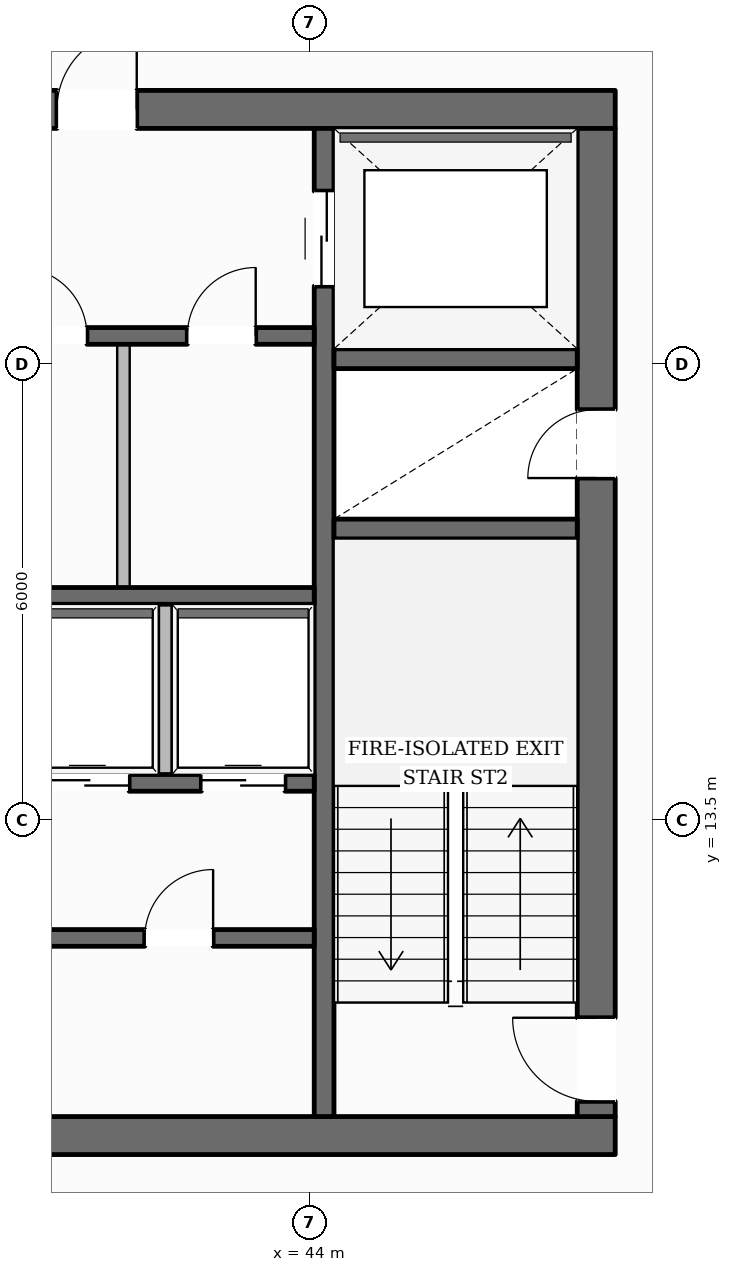
"""IFC4 building model, lengths in metres.
Left out: names, types, materials, properties, quantities, classifications, styles, units other than length and angle.
Written with IfcOpenShell. Run it as: python <this file> out.ifc"""

import sys

from ifc_helpers import new_model, si_unit, direction, frame, frame_2d, origin, place, context, subcontext, project, spatial, rectangle, extrude, element, fill, save


model = new_model("IFC4")
c1 = context("Model", 3, precision=1e-05, world=origin(), true_north=direction((0.0, 1.0)))
c2 = subcontext(c1, "Body", "Model", "MODEL_VIEW")
j1 = project(units=[si_unit("LENGTHUNIT", "METRE"), si_unit("PLANEANGLEUNIT", "RADIAN")], contexts=[c1])
p1 = place(None, origin())
s1 = spatial("IfcSite", under=j1, at=p1, CompositionType="ELEMENT")
p2 = place(p1, origin())
s2 = spatial("IfcBuilding", under=s1, at=p2, CompositionType="ELEMENT")
p3 = place(p2, frame((0.0, 0.0, 120.15)))
s3 = spatial("IfcBuildingStorey", under=s2, at=p3, CompositionType="ELEMENT", Elevation=120.15)
p4 = place(p3, frame((27.98, 9.35, 0.0), z_axis=(0.0, 0.0, 1.0), x_axis=(1.0, 0.0, 0.0)))
e1 = element("IfcWall", 1, at=p4, inside=s3, PredefinedType="SOLIDWALL", context=c2, shape_type="SweptSolid", body=[
    extrude(rectangle(XDim=20.04, YDim=0.5, at=frame_2d((10.02, 0.0))), origin(), (0.0, 0.0, 1.0), 3.6),
])
p5 = place(p4, frame((10.52, 0.0, 0.0)))
e2 = element("IfcOpeningElement", 2, at=p5, cuts=e1, PredefinedType="OPENING", context=c2, shape_type="SweptSolid", body=[
    extrude(rectangle(XDim=1.4, YDim=2.2, at=frame_2d((0.7, 1.1))), frame((0.0, 0.26, 0.0), z_axis=(0.0, -1.0, 0.0), x_axis=(1.0, 0.0, 0.0)), (0.0, 0.0, 1.0), 0.52),
])
p6 = place(p3, frame((27.98, 22.85, 0.0), z_axis=(0.0, 0.0, 1.0), x_axis=(1.0, 0.0, 0.0)))
e3 = element("IfcWall", 3, at=p6, inside=s3, PredefinedType="SOLIDWALL", context=c2, shape_type="SweptSolid", body=[
    extrude(rectangle(XDim=20.04, YDim=0.5, at=frame_2d((10.02, 0.0))), origin(), (0.0, 0.0, 1.0), 3.6),
])
p7 = place(p6, frame((6.295, 0.0, 0.0)))
e4 = element("IfcOpeningElement", 4, at=p7, cuts=e3, PredefinedType="OPENING", context=c2, shape_type="SweptSolid", body=[
    extrude(rectangle(XDim=1.05, YDim=2.15, at=frame_2d((0.525, 1.075))), frame((0.0, 0.26, 0.0), z_axis=(0.0, -1.0, 0.0), x_axis=(1.0, 0.0, 0.0)), (0.0, 0.0, 1.0), 0.52),
])
p8 = place(p6, frame((12.695, 0.0, 0.0)))
e5 = element("IfcOpeningElement", 5, at=p8, cuts=e3, PredefinedType="OPENING", context=c2, shape_type="SweptSolid", body=[
    extrude(rectangle(XDim=1.05, YDim=2.15, at=frame_2d((0.525, 1.075))), frame((0.0, 0.26, 0.0), z_axis=(0.0, -1.0, 0.0), x_axis=(1.0, 0.0, 0.0)), (0.0, 0.0, 1.0), 0.52),
])
p9 = place(p3, frame((47.77, 9.6, 0.0), z_axis=(0.0, 0.0, 1.0), x_axis=(0.0, 1.0, 0.0)))
e6 = element("IfcWall", 6, at=p9, inside=s3, PredefinedType="SOLIDWALL", context=c2, shape_type="SweptSolid", body=[
    extrude(rectangle(XDim=13.0, YDim=0.5, at=frame_2d((6.5, 0.0))), origin(), (0.0, 0.0, 1.0), 3.6),
])
p10 = place(p9, frame((0.2, 0.0, 0.0)))
e7 = element("IfcOpeningElement", 7, at=p10, cuts=e6, PredefinedType="OPENING", context=c2, shape_type="SweptSolid", body=[
    extrude(rectangle(XDim=1.1, YDim=2.15, at=frame_2d((0.55, 1.075))), frame((0.0, 0.26, 0.0), z_axis=(0.0, -1.0, 0.0), x_axis=(1.0, 0.0, 0.0)), (0.0, 0.0, 1.0), 0.52),
])
p11 = place(p9, frame((8.4, 0.0, 0.0)))
e8 = element("IfcOpeningElement", 8, at=p11, cuts=e6, PredefinedType="OPENING", context=c2, shape_type="SweptSolid", body=[
    extrude(rectangle(XDim=0.9, YDim=2.1, at=frame_2d((0.45, 1.05))), frame((0.0, 0.26, 0.0), z_axis=(0.0, -1.0, 0.0), x_axis=(1.0, 0.0, 0.0)), (0.0, 0.0, 1.0), 0.52),
])
p12 = place(p3, frame((44.19, 9.6, 0.0), z_axis=(0.0, 0.0, 1.0), x_axis=(0.0, 1.0, 0.0)))
e9 = element("IfcWall", 9, at=p12, inside=s3, PredefinedType="SHEAR", context=c2, shape_type="SweptSolid", body=[
    extrude(rectangle(XDim=13.0, YDim=0.26, at=frame_2d((6.5, 0.0))), origin(), (0.0, 0.0, 1.0), 3.6),
])
p13 = place(p12, frame((10.925, 0.0, 0.0)))
e10 = element("IfcOpeningElement", 10, at=p13, cuts=e9, PredefinedType="OPENING", context=c2, shape_type="SweptSolid", body=[
    extrude(rectangle(XDim=1.25, YDim=2.25, at=frame_2d((0.625, 1.125))), frame((0.0, 0.14, 0.0), z_axis=(0.0, -1.0, 0.0), x_axis=(1.0, 0.0, 0.0)), (0.0, 0.0, 1.0), 0.28),
])
for number, where, z_axis, x_axis in (
    (11, (44.32, 17.33, 0.0), (0.0, 0.0, 1.0), (1.0, 0.0, 0.0)),
    (12, (44.32, 19.57, 0.0), (0.0, 0.0, 1.0), (1.0, 0.0, 0.0)),
):
    element("IfcWall", number, at=place(p3, frame(where, z_axis=z_axis, x_axis=x_axis)), inside=s3, PredefinedType="SHEAR", context=c2, shape_type="SweptSolid", body=[
        extrude(rectangle(XDim=3.2, YDim=0.26, at=frame_2d((1.6, 0.0))), origin(), (0.0, 0.0, 1.0), 3.6),
    ])
p14 = place(p3, frame((31.94, 19.87, 0.0), z_axis=(0.0, 0.0, 1.0), x_axis=(1.0, 0.0, 0.0)))
e13 = element("IfcWall", 13, at=p14, inside=s3, PredefinedType="SOLIDWALL", context=c2, shape_type="SweptSolid", body=[
    extrude(rectangle(XDim=12.12, YDim=0.22, at=frame_2d((6.06, 0.0))), origin(), (0.0, 0.0, 1.0), 3.6),
])
p15 = place(p14, frame((6.3, 0.0, 0.0)))
e14 = element("IfcOpeningElement", 14, at=p15, cuts=e13, PredefinedType="OPENING", context=c2, shape_type="SweptSolid", body=[
    extrude(rectangle(XDim=1.1, YDim=2.15, at=frame_2d((0.55, 1.075))), frame((0.0, 0.12, 0.0), z_axis=(0.0, -1.0, 0.0), x_axis=(1.0, 0.0, 0.0)), (0.0, 0.0, 1.0), 0.24),
])
p16 = place(p14, frame((8.23, 0.0, 0.0)))
e15 = element("IfcOpeningElement", 15, at=p16, cuts=e13, PredefinedType="OPENING", context=c2, shape_type="SweptSolid", body=[
    extrude(rectangle(XDim=0.9, YDim=2.1, at=frame_2d((0.45, 1.05))), frame((0.0, 0.12, 0.0), z_axis=(0.0, -1.0, 0.0), x_axis=(1.0, 0.0, 0.0)), (0.0, 0.0, 1.0), 0.24),
])
p17 = place(p14, frame((10.45, 0.0, 0.0)))
e16 = element("IfcOpeningElement", 16, at=p17, cuts=e13, PredefinedType="OPENING", context=c2, shape_type="SweptSolid", body=[
    extrude(rectangle(XDim=0.9, YDim=2.1, at=frame_2d((0.45, 1.05))), frame((0.0, 0.12, 0.0), z_axis=(0.0, -1.0, 0.0), x_axis=(1.0, 0.0, 0.0)), (0.0, 0.0, 1.0), 0.24),
])
p18 = place(p3, frame((31.94, 16.45, 0.0), z_axis=(0.0, 0.0, 1.0), x_axis=(1.0, 0.0, 0.0)))
e17 = element("IfcWall", 17, at=p18, inside=s3, PredefinedType="SOLIDWALL", context=c2, shape_type="SweptSolid", body=[
    extrude(rectangle(XDim=12.12, YDim=0.22, at=frame_2d((6.06, 0.0))), origin(), (0.0, 0.0, 1.0), 3.6),
])
p19 = place(p3, frame((31.94, 13.99, 0.0), z_axis=(0.0, 0.0, 1.0), x_axis=(1.0, 0.0, 0.0)))
e18 = element("IfcWall", 18, at=p19, inside=s3, PredefinedType="SOLIDWALL", context=c2, shape_type="SweptSolid", body=[
    extrude(rectangle(XDim=12.12, YDim=0.22, at=frame_2d((6.06, 0.0))), origin(), (0.0, 0.0, 1.0), 3.6),
])
p20 = place(p19, frame((2.51, 0.0, 0.0)))
e19 = element("IfcOpeningElement", 19, at=p20, cuts=e18, PredefinedType="OPENING", context=c2, shape_type="SweptSolid", body=[
    extrude(rectangle(XDim=0.9, YDim=2.1, at=frame_2d((0.45, 1.05))), frame((0.0, 0.12, 0.0), z_axis=(0.0, -1.0, 0.0), x_axis=(1.0, 0.0, 0.0)), (0.0, 0.0, 1.0), 0.24),
])
p21 = place(p19, frame((6.535, 0.0, 0.0)))
e20 = element("IfcOpeningElement", 20, at=p21, cuts=e18, PredefinedType="OPENING", context=c2, shape_type="SweptSolid", body=[
    extrude(rectangle(XDim=1.1, YDim=2.2, at=frame_2d((0.55, 1.1))), frame((0.0, 0.12, 0.0), z_axis=(0.0, -1.0, 0.0), x_axis=(1.0, 0.0, 0.0)), (0.0, 0.0, 1.0), 0.24),
])
p22 = place(p19, frame((8.585, 0.0, 0.0)))
e21 = element("IfcOpeningElement", 21, at=p22, cuts=e18, PredefinedType="OPENING", context=c2, shape_type="SweptSolid", body=[
    extrude(rectangle(XDim=1.1, YDim=2.2, at=frame_2d((0.55, 1.1))), frame((0.0, 0.12, 0.0), z_axis=(0.0, -1.0, 0.0), x_axis=(1.0, 0.0, 0.0)), (0.0, 0.0, 1.0), 0.24),
])
p23 = place(p19, frame((10.635, 0.0, 0.0)))
e22 = element("IfcOpeningElement", 22, at=p23, cuts=e18, PredefinedType="OPENING", context=c2, shape_type="SweptSolid", body=[
    extrude(rectangle(XDim=1.1, YDim=2.2, at=frame_2d((0.55, 1.1))), frame((0.0, 0.12, 0.0), z_axis=(0.0, -1.0, 0.0), x_axis=(1.0, 0.0, 0.0)), (0.0, 0.0, 1.0), 0.24),
])
p24 = place(p3, frame((40.28, 11.95, 0.0), z_axis=(0.0, 0.0, 1.0), x_axis=(1.0, 0.0, 0.0)))
e23 = element("IfcWall", 23, at=p24, inside=s3, PredefinedType="SOLIDWALL", context=c2, shape_type="SweptSolid", body=[
    extrude(rectangle(XDim=3.78, YDim=0.22, at=frame_2d((1.89, 0.0))), origin(), (0.0, 0.0, 1.0), 3.6),
])
p25 = place(p24, frame((1.55, 0.0, 0.0)))
e24 = element("IfcOpeningElement", 24, at=p25, cuts=e23, PredefinedType="OPENING", context=c2, shape_type="SweptSolid", body=[
    extrude(rectangle(XDim=0.9, YDim=2.1, at=frame_2d((0.45, 1.05))), frame((0.0, 0.12, 0.0), z_axis=(0.0, -1.0, 0.0), x_axis=(1.0, 0.0, 0.0)), (0.0, 0.0, 1.0), 0.24),
])
p26 = place(p3, frame((43.959, 44.406, 0.0), z_axis=(0.0, 0.0, 1.0), x_axis=(0.50514079069, -0.863036952616, 0.0)))
e25 = element("IfcWall", 25, at=p26, inside=s3, PredefinedType="STANDARD", context=c2, shape_type="SweptSolid", body=[
    extrude(rectangle(XDim=36.948, YDim=0.38, at=frame_2d((18.474, 0.0))), origin(), (0.0, 0.0, 1.0), 3.059),
])
p27 = place(p26, frame((32.695, 0.0, 0.65)))
e26 = element("IfcOpeningElement", 26, at=p27, cuts=e25, PredefinedType="OPENING", context=c2, shape_type="SweptSolid", body=[
    extrude(rectangle(XDim=1.55, YDim=1.75, at=frame_2d((0.775, 0.875))), frame((0.0, 0.2, 0.0), z_axis=(0.0, -1.0, 0.0), x_axis=(1.0, 0.0, 0.0)), (0.0, 0.0, 1.0), 0.4),
])
p28 = place(p26, frame((26.696, 0.0, 0.65)))
e27 = element("IfcOpeningElement", 27, at=p28, cuts=e25, PredefinedType="OPENING", context=c2, shape_type="SweptSolid", body=[
    extrude(rectangle(XDim=1.55, YDim=1.75, at=frame_2d((0.775, 0.875))), frame((0.0, 0.2, 0.0), z_axis=(0.0, -1.0, 0.0), x_axis=(1.0, 0.0, 0.0)), (0.0, 0.0, 1.0), 0.4),
])
p29 = place(p26, frame((20.696, 0.0, 0.65)))
e28 = element("IfcOpeningElement", 28, at=p29, cuts=e25, PredefinedType="OPENING", context=c2, shape_type="SweptSolid", body=[
    extrude(rectangle(XDim=1.55, YDim=1.75, at=frame_2d((0.775, 0.875))), frame((0.0, 0.2, 0.0), z_axis=(0.0, -1.0, 0.0), x_axis=(1.0, 0.0, 0.0)), (0.0, 0.0, 1.0), 0.4),
])
p30 = place(p26, frame((8.697, 0.0, 0.65)))
e29 = element("IfcOpeningElement", 29, at=p30, cuts=e25, PredefinedType="OPENING", context=c2, shape_type="SweptSolid", body=[
    extrude(rectangle(XDim=1.55, YDim=1.75, at=frame_2d((0.775, 0.875))), frame((0.0, 0.2, 0.0), z_axis=(0.0, -1.0, 0.0), x_axis=(1.0, 0.0, 0.0)), (0.0, 0.0, 1.0), 0.4),
])
p31 = place(p26, frame((2.698, 0.0, 0.65)))
e30 = element("IfcOpeningElement", 30, at=p31, cuts=e25, PredefinedType="OPENING", context=c2, shape_type="SweptSolid", body=[
    extrude(rectangle(XDim=1.55, YDim=1.75, at=frame_2d((0.775, 0.875))), frame((0.0, 0.2, 0.0), z_axis=(0.0, -1.0, 0.0), x_axis=(1.0, 0.0, 0.0)), (0.0, 0.0, 1.0), 0.4),
])
p32 = place(p3, frame((42.1, 14.1, 0.0), z_axis=(0.0, 0.0, 1.0), x_axis=(0.0, 1.0, 0.0)))
e31 = element("IfcWall", 31, at=p32, inside=s3, PredefinedType="PARTITIONING", context=c2, shape_type="SweptSolid", body=[
    extrude(rectangle(XDim=2.24, YDim=0.165, at=frame_2d((1.12, 0.0))), origin(), (0.0, 0.0, 1.0), 3.6),
])
p33 = place(p3, frame((41.55, 16.56, 0.0), z_axis=(0.0, 0.0, 1.0), x_axis=(0.0, 1.0, 0.0)))
e32 = element("IfcWall", 32, at=p33, inside=s3, PredefinedType="PARTITIONING", context=c2, shape_type="SweptSolid", body=[
    extrude(rectangle(XDim=3.2, YDim=0.165, at=frame_2d((1.6, 0.0))), origin(), (0.0, 0.0, 1.0), 3.6),
])
p34 = place(p10, origin())
e33 = element("IfcDoor", 33, at=p34, inside=s3, OperationType="SINGLE_SWING_RIGHT", PredefinedType="DOOR", context=c2, shape_type="SweptSolid", body=[
    extrude(rectangle(XDim=1.1, YDim=2.15, at=frame_2d((0.55, 1.075))), frame((0.0, 0.025, 0.0), z_axis=(0.0, -1.0, 0.0), x_axis=(1.0, 0.0, 0.0)), (0.0, 0.0, 1.0), 0.05),
])
fill(e7, e33)
p35 = place(p11, origin())
e34 = element("IfcDoor", 34, at=p35, inside=s3, OperationType="SINGLE_SWING_LEFT", PredefinedType="DOOR", context=c2, shape_type="SweptSolid", body=[
    extrude(rectangle(XDim=0.9, YDim=2.1, at=frame_2d((0.45, 1.05))), frame((0.0, 0.025, 0.0), z_axis=(0.0, -1.0, 0.0), x_axis=(1.0, 0.0, 0.0)), (0.0, 0.0, 1.0), 0.05),
])
fill(e8, e34)
p36 = place(p8, origin())
e35 = element("IfcDoor", 35, at=p36, inside=s3, OperationType="SINGLE_SWING_RIGHT", PredefinedType="DOOR", context=c2, shape_type="SweptSolid", body=[
    extrude(rectangle(XDim=1.05, YDim=2.15, at=frame_2d((0.525, 1.075))), frame((0.0, 0.025, 0.0), z_axis=(0.0, -1.0, 0.0), x_axis=(1.0, 0.0, 0.0)), (0.0, 0.0, 1.0), 0.05),
])
fill(e5, e35)
p37 = place(p13, origin())
e36 = element("IfcDoor", 36, at=p37, inside=s3, OperationType="DOUBLE_DOOR_SLIDING", PredefinedType="DOOR", context=c2, shape_type="SweptSolid", body=[
    extrude(rectangle(XDim=1.25, YDim=2.25, at=frame_2d((0.625, 1.125))), frame((0.0, 0.025, 0.0), z_axis=(0.0, -1.0, 0.0), x_axis=(1.0, 0.0, 0.0)), (0.0, 0.0, 1.0), 0.05),
])
fill(e10, e36)
p38 = place(p22, origin())
e37 = element("IfcDoor", 37, at=p38, inside=s3, OperationType="DOUBLE_DOOR_SLIDING", PredefinedType="DOOR", context=c2, shape_type="SweptSolid", body=[
    extrude(rectangle(XDim=1.1, YDim=2.2, at=frame_2d((0.55, 1.1))), frame((0.0, 0.025, 0.0), z_axis=(0.0, -1.0, 0.0), x_axis=(1.0, 0.0, 0.0)), (0.0, 0.0, 1.0), 0.05),
])
fill(e21, e37)
p39 = place(p23, origin())
e38 = element("IfcDoor", 38, at=p39, inside=s3, OperationType="DOUBLE_DOOR_SLIDING", PredefinedType="DOOR", context=c2, shape_type="SweptSolid", body=[
    extrude(rectangle(XDim=1.1, YDim=2.2, at=frame_2d((0.55, 1.1))), frame((0.0, 0.025, 0.0), z_axis=(0.0, -1.0, 0.0), x_axis=(1.0, 0.0, 0.0)), (0.0, 0.0, 1.0), 0.05),
])
fill(e22, e38)
p40 = place(p16, origin())
e39 = element("IfcDoor", 39, at=p40, inside=s3, OperationType="SINGLE_SWING_LEFT", PredefinedType="DOOR", context=c2, shape_type="SweptSolid", body=[
    extrude(rectangle(XDim=0.9, YDim=2.1, at=frame_2d((0.45, 1.05))), frame((0.0, 0.025, 0.0), z_axis=(0.0, -1.0, 0.0), x_axis=(1.0, 0.0, 0.0)), (0.0, 0.0, 1.0), 0.05),
])
fill(e15, e39)
p41 = place(p17, origin())
e40 = element("IfcDoor", 40, at=p41, inside=s3, OperationType="SINGLE_SWING_RIGHT", PredefinedType="DOOR", context=c2, shape_type="SweptSolid", body=[
    extrude(rectangle(XDim=0.9, YDim=2.1, at=frame_2d((0.45, 1.05))), frame((0.0, 0.025, 0.0), z_axis=(0.0, -1.0, 0.0), x_axis=(1.0, 0.0, 0.0)), (0.0, 0.0, 1.0), 0.05),
])
fill(e16, e40)
p42 = place(p25, origin())
e41 = element("IfcDoor", 41, at=p42, inside=s3, OperationType="SINGLE_SWING_RIGHT", PredefinedType="DOOR", context=c2, shape_type="SweptSolid", body=[
    extrude(rectangle(XDim=0.9, YDim=2.1, at=frame_2d((0.45, 1.05))), frame((0.0, 0.025, 0.0), z_axis=(0.0, -1.0, 0.0), x_axis=(1.0, 0.0, 0.0)), (0.0, 0.0, 1.0), 0.05),
])
fill(e24, e41)
save(model, sys.argv[1])
